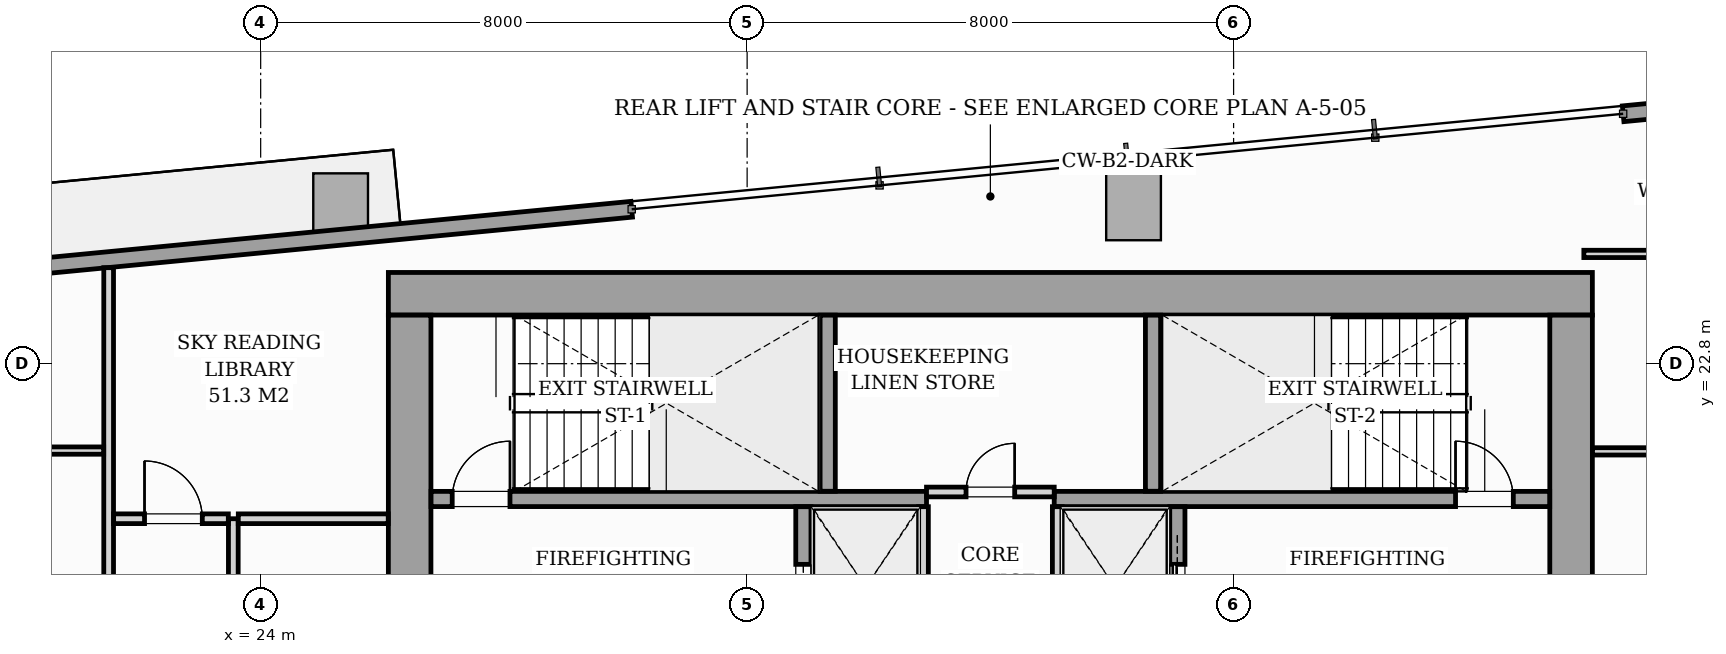
"""IFC4 building model, lengths in metres.
Left out: names, types, materials, properties, quantities, classifications, styles, units other than length and angle.
Written with IfcOpenShell. Run it as: python <this file> out.ifc"""

import sys

from ifc_helpers import new_model, si_unit, direction, frame, frame_2d, origin, origin_2d, place, context, subcontext, project, spatial, rectangle, i_section, extrude, source, transform, mapped, element, fill, save


model = new_model("IFC4")
c1 = context("Model", 3, precision=1e-05, world=origin(), true_north=direction((0.0, 1.0)))
c2 = subcontext(c1, "Body", "Model", "MODEL_VIEW")
j1 = project(units=[si_unit("LENGTHUNIT", "METRE"), si_unit("PLANEANGLEUNIT", "RADIAN")], contexts=[c1])
p1 = place(None, origin())
s1 = spatial("IfcSite", under=j1, at=p1, CompositionType="ELEMENT")
p2 = place(p1, origin())
s2 = spatial("IfcBuilding", under=s1, at=p2, CompositionType="ELEMENT")
p3 = place(p2, frame((0.0, 0.0, 106.6)))
s3 = spatial("IfcBuildingStorey", under=s2, at=p3, CompositionType="ELEMENT", Elevation=106.6)
m1 = source(origin(), c2, "Body", "SweptSolid", [
    extrude(i_section(OverallWidth=0.427, OverallDepth=0.483, WebThickness=0.051, FlangeThickness=0.082, FilletRadius=0.018, at=origin_2d()), origin(), (0.0, 0.0, 1.0), 3.196),
])
for number, where, z_axis, x_axis in (
    (1, (26.4, 24.0, 0.002), (0.0, 0.0, 1.0), (1.0, 0.0, 0.0)),
    (2, (33.12, 24.0, 0.002), (0.0, 0.0, 1.0), (1.0, 0.0, 0.0)),
    (3, (38.88, 24.0, 0.002), (0.0, 0.0, 1.0), (1.0, 0.0, 0.0)),
    (4, (45.6, 24.0, 0.002), (0.0, 0.0, 1.0), (1.0, 0.0, 0.0)),
):
    element("IfcColumn", number, at=place(p3, frame(where, z_axis=z_axis, x_axis=x_axis)), inside=s3, PredefinedType="PILASTER", context=c2, shape_type="MappedRepresentation", body=[
        mapped(m1, transform((0.0, 0.0, 0.0), scale=1.0)),
    ])
m2 = source(origin(), c2, "Body", "SweptSolid", [
    extrude(rectangle(XDim=0.9, YDim=1.1, at=origin_2d()), origin(), (0.0, 0.0, 1.0), 3.196),
])
for number, where, z_axis, x_axis in (
    (5, (25.315, 25.38, 0.002), (0.0, 0.0, 1.0), (0.995, 0.096, 0.0)),
    (6, (38.354, 25.38, 0.002), (0.0, 0.0, 1.0), (0.995, 0.096, 0.0)),
):
    element("IfcColumn", number, at=place(p3, frame(where, z_axis=z_axis, x_axis=x_axis)), inside=s3, PredefinedType="COLUMN", context=c2, shape_type="MappedRepresentation", body=[
        mapped(m2, transform((0.0, 0.0, 0.0), scale=1.0)),
    ])
p4 = place(p3, frame((11.08, 23.508, 0.0), z_axis=(0.0, 0.0, 1.0), x_axis=(0.995396638587, 0.095841180552, 0.0)))
e7 = element("IfcWall", 7, at=p4, inside=s3, PredefinedType="STANDARD", context=c2, shape_type="SweptSolid", body=[
    extrude(rectangle(XDim=19.11, YDim=0.26, at=frame_2d((9.555, 0.0))), origin(), (0.0, 0.0, 1.0), 2.94),
])
p5 = place(p4, frame((7.159, 0.0, 0.0)))
e8 = element("IfcOpeningElement", 8, at=p5, cuts=e7, PredefinedType="OPENING", context=c2, shape_type="SweptSolid", body=[
    extrude(rectangle(XDim=1.8, YDim=2.06, at=frame_2d((0.9, 1.03))), frame((0.0, 0.14, 0.0), z_axis=(0.0, -1.0, 0.0), x_axis=(1.0, 0.0, 0.0)), (0.0, 0.0, 1.0), 0.28),
])
p6 = place(p4, frame((2.05, 0.0, 0.65)))
e9 = element("IfcOpeningElement", 9, at=p6, cuts=e7, PredefinedType="OPENING", context=c2, shape_type="SweptSolid", body=[
    extrude(rectangle(XDim=1.6, YDim=1.5, at=frame_2d((0.8, 0.75))), frame((0.0, 0.14, 0.0), z_axis=(0.0, -1.0, 0.0), x_axis=(1.0, 0.0, 0.0)), (0.0, 0.0, 1.0), 0.28),
])
p7 = place(p3, frame((46.406, 26.91, 0.0), z_axis=(0.0, 0.0, 1.0), x_axis=(0.995396638587, 0.095841180552, 0.0)))
e10 = element("IfcWall", 10, at=p7, inside=s3, PredefinedType="STANDARD", context=c2, shape_type="SweptSolid", body=[
    extrude(rectangle(XDim=19.11, YDim=0.26, at=frame_2d((9.555, 0.0))), origin(), (0.0, 0.0, 1.0), 2.94),
])
p8 = place(p7, frame((9.69, 0.0, 0.0)))
e11 = element("IfcOpeningElement", 11, at=p8, cuts=e10, PredefinedType="OPENING", context=c2, shape_type="SweptSolid", body=[
    extrude(rectangle(XDim=1.8, YDim=2.06, at=frame_2d((0.9, 1.03))), frame((0.0, 0.14, 0.0), z_axis=(0.0, -1.0, 0.0), x_axis=(1.0, 0.0, 0.0)), (0.0, 0.0, 1.0), 0.28),
])
p9 = place(p7, frame((0.7, 0.0, 0.65)))
e12 = element("IfcOpeningElement", 12, at=p9, cuts=e10, PredefinedType="OPENING", context=c2, shape_type="SweptSolid", body=[
    extrude(rectangle(XDim=1.6, YDim=1.5, at=frame_2d((0.8, 0.75))), frame((0.0, 0.14, 0.0), z_axis=(0.0, -1.0, 0.0), x_axis=(1.0, 0.0, 0.0)), (0.0, 0.0, 1.0), 0.28),
])
p10 = place(p3, frame((26.1, 23.95, 0.0), z_axis=(0.0, 0.0, 1.0), x_axis=(1.0, 0.0, 0.0)))
e13 = element("IfcWall", 13, at=p10, inside=s3, PredefinedType="SHEAR", context=c2, shape_type="SweptSolid", body=[
    extrude(rectangle(XDim=19.8, YDim=0.7, at=frame_2d((9.9, 0.0))), origin(), (0.0, 0.0, 1.0), 3.2),
])
for number, where, z_axis, x_axis in (
    (14, (26.45, 17.802, 0.0), (0.0, 0.0, 1.0), (0.0, 1.0, 0.0)),
    (15, (45.55, 17.802, 0.0), (0.0, 0.0, 1.0), (0.0, 1.0, 0.0)),
):
    element("IfcWall", number, at=place(p3, frame(where, z_axis=z_axis, x_axis=x_axis)), inside=s3, PredefinedType="SHEAR", context=c2, shape_type="SweptSolid", body=[
        extrude(rectangle(XDim=5.796, YDim=0.7, at=frame_2d((2.898, 0.0))), origin(), (0.0, 0.0, 1.0), 3.2),
    ])
p11 = place(p3, frame((26.802, 20.575, 0.0), z_axis=(0.0, 0.0, 1.0), x_axis=(1.0, 0.0, 0.0)))
e16 = element("IfcWall", 16, at=p11, inside=s3, PredefinedType="SOLIDWALL", context=c2, shape_type="SweptSolid", body=[
    extrude(rectangle(XDim=8.148, YDim=0.25, at=frame_2d((4.074, 0.0))), origin(), (0.0, 0.0, 1.0), 3.2),
])
p12 = place(p11, frame((0.348, 0.0, 0.0)))
e17 = element("IfcOpeningElement", 17, at=p12, cuts=e16, PredefinedType="OPENING", context=c2, shape_type="SweptSolid", body=[
    extrude(rectangle(XDim=0.95, YDim=2.06, at=frame_2d((0.475, 1.03))), frame((0.0, 0.135, 0.0), z_axis=(0.0, -1.0, 0.0), x_axis=(1.0, 0.0, 0.0)), (0.0, 0.0, 1.0), 0.27),
])
p13 = place(p3, frame((37.05, 20.575, 0.0), z_axis=(0.0, 0.0, 1.0), x_axis=(1.0, 0.0, 0.0)))
e18 = element("IfcWall", 18, at=p13, inside=s3, PredefinedType="SOLIDWALL", context=c2, shape_type="SweptSolid", body=[
    extrude(rectangle(XDim=8.148, YDim=0.25, at=frame_2d((4.074, 0.0))), origin(), (0.0, 0.0, 1.0), 3.2),
])
p14 = place(p13, frame((6.6, 0.0, 0.0)))
e19 = element("IfcOpeningElement", 19, at=p14, cuts=e18, PredefinedType="OPENING", context=c2, shape_type="SweptSolid", body=[
    extrude(rectangle(XDim=0.95, YDim=2.06, at=frame_2d((0.475, 1.03))), frame((0.0, 0.135, 0.0), z_axis=(0.0, -1.0, 0.0), x_axis=(1.0, 0.0, 0.0)), (0.0, 0.0, 1.0), 0.27),
])
for number, where, z_axis, x_axis in (
    (20, (33.325, 20.702, 0.0), (0.0, 0.0, 1.0), (0.0, 1.0, 0.0)),
    (21, (38.675, 20.702, 0.0), (0.0, 0.0, 1.0), (0.0, 1.0, 0.0)),
):
    element("IfcWall", number, at=place(p3, frame(where, z_axis=z_axis, x_axis=x_axis)), inside=s3, PredefinedType="SOLIDWALL", context=c2, shape_type="SweptSolid", body=[
        extrude(rectangle(XDim=2.896, YDim=0.25, at=frame_2d((1.448, 0.0))), origin(), (0.0, 0.0, 1.0), 3.2),
    ])
p15 = place(p3, frame((32.925, 17.802, 0.0), z_axis=(0.0, 0.0, 1.0), x_axis=(0.0, 1.0, 0.0)))
e22 = element("IfcWall", 22, at=p15, inside=s3, PredefinedType="SOLIDWALL", context=c2, shape_type="SweptSolid", body=[
    extrude(rectangle(XDim=2.646, YDim=0.25, at=frame_2d((1.323, 0.0))), origin(), (0.0, 0.0, 1.0), 3.2),
])
p16 = place(p15, frame((0.598, 0.0, 0.0)))
e23 = element("IfcOpeningElement", 23, at=p16, cuts=e22, PredefinedType="OPENING", context=c2, shape_type="SweptSolid", body=[
    extrude(rectangle(XDim=1.1, YDim=2.08, at=frame_2d((0.55, 1.04))), frame((0.0, 0.135, 0.0), z_axis=(0.0, -1.0, 0.0), x_axis=(1.0, 0.0, 0.0)), (0.0, 0.0, 1.0), 0.27),
])
for number, where, z_axis, x_axis in (
    (24, (34.9, 17.802, 0.0), (0.0, 0.0, 1.0), (0.0, 1.0, 0.0)),
    (25, (37.1, 17.802, 0.0), (0.0, 0.0, 1.0), (0.0, 1.0, 0.0)),
):
    element("IfcWall", number, at=place(p3, frame(where, z_axis=z_axis, x_axis=x_axis)), inside=s3, PredefinedType="PARTITIONING", context=c2, shape_type="SweptSolid", body=[
        extrude(rectangle(XDim=2.646, YDim=0.16, at=frame_2d((1.323, 0.0))), origin(), (0.0, 0.0, 1.0), 2.94),
    ])
p17 = place(p3, frame((39.075, 17.802, 0.0), z_axis=(0.0, 0.0, 1.0), x_axis=(0.0, 1.0, 0.0)))
e26 = element("IfcWall", 26, at=p17, inside=s3, PredefinedType="SOLIDWALL", context=c2, shape_type="SweptSolid", body=[
    extrude(rectangle(XDim=2.646, YDim=0.25, at=frame_2d((1.323, 0.0))), origin(), (0.0, 0.0, 1.0), 3.2),
])
p18 = place(p17, frame((0.598, 0.0, 0.0)))
e27 = element("IfcOpeningElement", 27, at=p18, cuts=e26, PredefinedType="OPENING", context=c2, shape_type="SweptSolid", body=[
    extrude(rectangle(XDim=1.1, YDim=2.08, at=frame_2d((0.55, 1.04))), frame((0.0, 0.135, 0.0), z_axis=(0.0, -1.0, 0.0), x_axis=(1.0, 0.0, 0.0)), (0.0, 0.0, 1.0), 0.27),
])
p19 = place(p3, frame((34.95, 20.69, 0.0), z_axis=(0.0, 0.0, 1.0), x_axis=(1.0, 0.0, 0.0)))
e28 = element("IfcWall", 28, at=p19, inside=s3, PredefinedType="PARTITIONING", context=c2, shape_type="SweptSolid", body=[
    extrude(rectangle(XDim=2.1, YDim=0.16, at=frame_2d((1.05, 0.0))), origin(), (0.0, 0.0, 1.0), 2.94),
])
p20 = place(p19, frame((0.65, 0.0, 0.0)))
e29 = element("IfcOpeningElement", 29, at=p20, cuts=e28, PredefinedType="OPENING", context=c2, shape_type="SweptSolid", body=[
    extrude(rectangle(XDim=0.8, YDim=2.05, at=frame_2d((0.4, 1.025))), frame((0.0, 0.09, 0.0), z_axis=(0.0, -1.0, 0.0), x_axis=(1.0, 0.0, 0.0)), (0.0, 0.0, 1.0), 0.18),
])
p21 = place(p3, frame((21.5, 12.632, 0.0), z_axis=(0.0, 0.0, 1.0), x_axis=(0.0, 1.0, 0.0)))
e30 = element("IfcWall", 30, at=p21, inside=s3, PredefinedType="PARTITIONING", context=c2, shape_type="SweptSolid", body=[
    extrude(rectangle(XDim=11.747, YDim=0.16, at=frame_2d((5.873, 0.0))), origin(), (0.0, 0.0, 1.0), 2.94),
])
p22 = place(p21, frame((0.493, 0.0, 0.0)))
e31 = element("IfcOpeningElement", 31, at=p22, cuts=e30, PredefinedType="OPENING", context=c2, shape_type="SweptSolid", body=[
    extrude(rectangle(XDim=0.95, YDim=2.06, at=frame_2d((0.475, 1.03))), frame((0.0, 0.09, 0.0), z_axis=(0.0, -1.0, 0.0), x_axis=(1.0, 0.0, 0.0)), (0.0, 0.0, 1.0), 0.18),
])
p23 = place(p3, frame((10.293, 21.371, 0.0), z_axis=(0.0, 0.0, 1.0), x_axis=(1.0, 0.0, 0.0)))
e32 = element("IfcWall", 32, at=p23, inside=s3, PredefinedType="PARTITIONING", context=c2, shape_type="SweptSolid", body=[
    extrude(rectangle(XDim=11.125, YDim=0.12, at=frame_2d((5.562, 0.0))), origin(), (0.0, 0.0, 1.0), 2.94),
])
p24 = place(p23, frame((6.33, 0.0, 0.0)))
e33 = element("IfcOpeningElement", 33, at=p24, cuts=e32, PredefinedType="OPENING", context=c2, shape_type="SweptSolid", body=[
    extrude(rectangle(XDim=0.85, YDim=2.05, at=frame_2d((0.425, 1.025))), frame((0.0, 0.07, 0.0), z_axis=(0.0, -1.0, 0.0), x_axis=(1.0, 0.0, 0.0)), (0.0, 0.0, 1.0), 0.14),
])
p25 = place(p3, frame((45.76, 24.605, 0.0), z_axis=(0.0, 0.0, 1.0), x_axis=(1.0, 0.0, 0.0)))
e34 = element("IfcWall", 34, at=p25, inside=s3, PredefinedType="PARTITIONING", context=c2, shape_type="SweptSolid", body=[
    extrude(rectangle(XDim=22.498, YDim=0.12, at=frame_2d((11.249, 0.0))), origin(), (0.0, 0.0, 1.0), 2.94),
])
p26 = place(p25, frame((10.931, 0.0, 0.0)))
e35 = element("IfcOpeningElement", 35, at=p26, cuts=e34, PredefinedType="OPENING", context=c2, shape_type="SweptSolid", body=[
    extrude(rectangle(XDim=0.85, YDim=2.05, at=frame_2d((0.425, 1.025))), frame((0.0, 0.07, 0.0), z_axis=(0.0, -1.0, 0.0), x_axis=(1.0, 0.0, 0.0)), (0.0, 0.0, 1.0), 0.14),
])
p27 = place(p3, frame((45.902, 21.358, 0.0), z_axis=(0.0, 0.0, 1.0), x_axis=(1.0, 0.0, 0.0)))
e36 = element("IfcWall", 36, at=p27, inside=s3, PredefinedType="PARTITIONING", context=c2, shape_type="SweptSolid", body=[
    extrude(rectangle(XDim=22.668, YDim=0.12, at=frame_2d((11.334, 0.0))), origin(), (0.0, 0.0, 1.0), 2.94),
])
p28 = place(p27, frame((10.945, 0.0, 0.0)))
e37 = element("IfcOpeningElement", 37, at=p28, cuts=e36, PredefinedType="OPENING", context=c2, shape_type="SweptSolid", body=[
    extrude(rectangle(XDim=0.85, YDim=2.05, at=frame_2d((0.425, 1.025))), frame((0.0, 0.07, 0.0), z_axis=(0.0, -1.0, 0.0), x_axis=(1.0, 0.0, 0.0)), (0.0, 0.0, 1.0), 0.14),
])
p29 = place(p3, frame((23.55, 14.66, 0.0), z_axis=(0.0, 0.0, 1.0), x_axis=(0.0, 1.0, 0.0)))
e38 = element("IfcWall", 38, at=p29, inside=s3, PredefinedType="PARTITIONING", context=c2, shape_type="SweptSolid", body=[
    extrude(rectangle(XDim=5.59, YDim=0.16, at=frame_2d((2.795, 0.0))), origin(), (0.0, 0.0, 1.0), 2.94),
])
p30 = place(p29, frame((2.36, 0.0, 0.0)))
e39 = element("IfcOpeningElement", 39, at=p30, cuts=e38, PredefinedType="OPENING", context=c2, shape_type="SweptSolid", body=[
    extrude(rectangle(XDim=0.95, YDim=2.06, at=frame_2d((0.475, 1.03))), frame((0.0, 0.09, 0.0), z_axis=(0.0, -1.0, 0.0), x_axis=(1.0, 0.0, 0.0)), (0.0, 0.0, 1.0), 0.18),
])
p31 = place(p3, frame((21.582, 20.25, 0.0), z_axis=(0.0, 0.0, 1.0), x_axis=(1.0, 0.0, 0.0)))
e40 = element("IfcWall", 40, at=p31, inside=s3, PredefinedType="PARTITIONING", context=c2, shape_type="SweptSolid", body=[
    extrude(rectangle(XDim=1.886, YDim=0.16, at=frame_2d((0.943, 0.0))), origin(), (0.0, 0.0, 1.0), 2.94),
])
p32 = place(p31, frame((0.508, 0.0, 0.0)))
e41 = element("IfcOpeningElement", 41, at=p32, cuts=e40, PredefinedType="OPENING", context=c2, shape_type="SweptSolid", body=[
    extrude(rectangle(XDim=0.95, YDim=2.06, at=frame_2d((0.475, 1.03))), frame((0.0, 0.09, 0.0), z_axis=(0.0, -1.0, 0.0), x_axis=(1.0, 0.0, 0.0)), (0.0, 0.0, 1.0), 0.18),
])
p33 = place(p3, frame((23.632, 20.25, 0.0), z_axis=(0.0, 0.0, 1.0), x_axis=(1.0, 0.0, 0.0)))
e42 = element("IfcWall", 42, at=p33, inside=s3, PredefinedType="PARTITIONING", context=c2, shape_type="SweptSolid", body=[
    extrude(rectangle(XDim=2.466, YDim=0.16, at=frame_2d((1.233, 0.0))), origin(), (0.0, 0.0, 1.0), 2.94),
])
m3 = source(origin(), c2, "Body", "SweptSolid", [
    extrude(rectangle(XDim=0.95, YDim=2.06, at=frame_2d((0.475, 1.03))), frame((0.0, 0.025, 0.0), z_axis=(0.0, -1.0, 0.0), x_axis=(1.0, 0.0, 0.0)), (0.0, 0.0, 1.0), 0.05),
])
p34 = place(p12, origin())
e43 = element("IfcDoor", 43, at=p34, inside=s3, OperationType="SINGLE_SWING_RIGHT", PredefinedType="DOOR", context=c2, shape_type="MappedRepresentation", body=[
    mapped(m3, transform((0.0, 0.0, 0.0), scale=1.0)),
])
fill(e17, e43)
p35 = place(p14, origin())
e44 = element("IfcDoor", 44, at=p35, inside=s3, OperationType="SINGLE_SWING_LEFT", PredefinedType="DOOR", context=c2, shape_type="MappedRepresentation", body=[
    mapped(m3, transform((0.0, 0.0, 0.0), scale=1.0)),
])
fill(e19, e44)
m4 = source(origin(), c2, "Body", "SweptSolid", [
    extrude(rectangle(XDim=1.1, YDim=2.08, at=frame_2d((0.55, 1.04))), frame((0.0, 0.025, 0.0), z_axis=(0.0, -1.0, 0.0), x_axis=(1.0, 0.0, 0.0)), (0.0, 0.0, 1.0), 0.05),
])
p36 = place(p16, origin())
e45 = element("IfcDoor", 45, at=p36, inside=s3, OperationType="SLIDING_TO_LEFT", PredefinedType="DOOR", context=c2, shape_type="MappedRepresentation", body=[
    mapped(m4, transform((0.0, 0.0, 0.0), scale=1.0)),
])
fill(e23, e45)
p37 = place(p18, origin())
e46 = element("IfcDoor", 46, at=p37, inside=s3, OperationType="SLIDING_TO_RIGHT", PredefinedType="DOOR", context=c2, shape_type="MappedRepresentation", body=[
    mapped(m4, transform((0.0, 0.0, 0.0), scale=1.0)),
])
fill(e27, e46)
m5 = source(origin(), c2, "Body", "SweptSolid", [
    extrude(rectangle(XDim=0.8, YDim=2.05, at=frame_2d((0.4, 1.025))), frame((0.0, 0.025, 0.0), z_axis=(0.0, -1.0, 0.0), x_axis=(1.0, 0.0, 0.0)), (0.0, 0.0, 1.0), 0.05),
])
p38 = place(p20, origin())
e47 = element("IfcDoor", 47, at=p38, inside=s3, OperationType="SINGLE_SWING_RIGHT", PredefinedType="DOOR", context=c2, shape_type="MappedRepresentation", body=[
    mapped(m5, transform((0.0, 0.0, 0.0), scale=1.0)),
])
fill(e29, e47)
m6 = source(origin(), c2, "Body", "SweptSolid", [
    extrude(rectangle(XDim=0.95, YDim=2.06, at=frame_2d((0.475, 1.03))), frame((0.0, 0.025, 0.0), z_axis=(0.0, -1.0, 0.0), x_axis=(1.0, 0.0, 0.0)), (0.0, 0.0, 1.0), 0.05),
])
p39 = place(p32, origin())
e48 = element("IfcDoor", 48, at=p39, inside=s3, OperationType="SINGLE_SWING_LEFT", PredefinedType="DOOR", context=c2, shape_type="MappedRepresentation", body=[
    mapped(m6, transform((0.0, 0.0, 0.0), scale=1.0)),
])
fill(e41, e48)
save(model, sys.argv[1])
